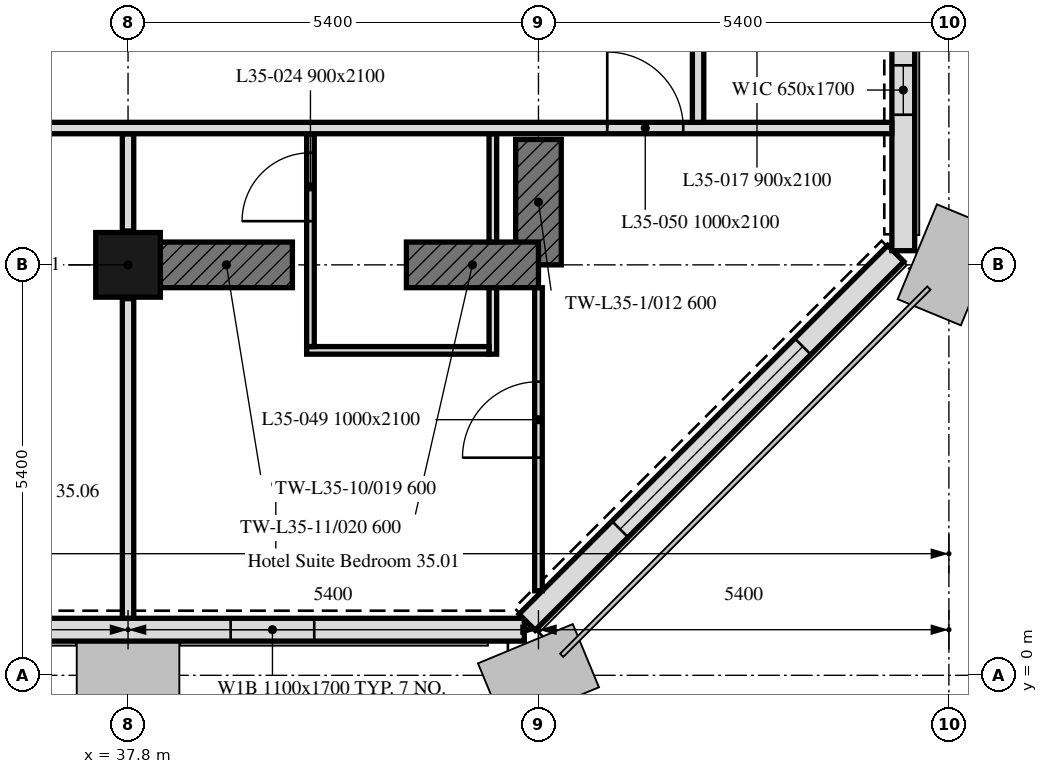
"""IFC4 building model, lengths in metres.
Left out: names, types, materials, properties, quantities, classifications, styles, units other than length and angle.
Written with IfcOpenShell. Run it as: python <this file> out.ifc"""

import sys

from ifc_helpers import new_model, si_unit, direction, frame, frame_2d, origin, origin_2d, place, context, subcontext, project, spatial, rectangle, extrude, element, fill, save


model = new_model("IFC4")
c1 = context("Model", 3, precision=1e-05, world=origin(), true_north=direction((0.0, 1.0)))
c2 = subcontext(c1, "Body", "Model", "MODEL_VIEW")
j1 = project(units=[si_unit("LENGTHUNIT", "METRE"), si_unit("PLANEANGLEUNIT", "RADIAN")], contexts=[c1])
p1 = place(None, origin())
s1 = spatial("IfcSite", under=j1, at=p1, CompositionType="ELEMENT")
p2 = place(p1, origin())
s2 = spatial("IfcBuilding", under=s1, at=p2, CompositionType="ELEMENT")
p3 = place(p2, frame((0.0, 0.0, 152.8)))
s3 = spatial("IfcBuildingStorey", under=s2, at=p3, CompositionType="ELEMENT", Elevation=152.8)
p4 = place(p3, frame((37.8, 5.4, 0.0), z_axis=(0.0, 0.0, 1.0), x_axis=(1.0, 0.0, 0.0)))
e1 = element("IfcColumn", 1, at=p4, inside=s3, PredefinedType="COLUMN", context=c2, shape_type="SweptSolid", body=[
    extrude(rectangle(XDim=0.85, YDim=0.85, at=origin_2d()), origin(), (0.0, 0.0, 1.0), 3.0),
])
p5 = place(p3, frame((43.2, 5.4, 0.0), z_axis=(0.0, 0.0, 1.0), x_axis=(0.0, 1.0, 0.0)))
e2 = element("IfcWall", 2, at=p5, inside=s3, PredefinedType="SHEAR", context=c2, shape_type="SweptSolid", body=[
    extrude(rectangle(XDim=1.65, YDim=0.6, at=frame_2d((0.825, 0.0))), origin(), (0.0, 0.0, 1.0), 3.0),
])
p6 = place(p3, frame((38.225, 5.4, 0.0), z_axis=(0.0, 0.0, 1.0), x_axis=(1.0, 0.0, 0.0)))
e3 = element("IfcWall", 3, at=p6, inside=s3, PredefinedType="SHEAR", context=c2, shape_type="SweptSolid", body=[
    extrude(rectangle(XDim=1.737, YDim=0.6, at=frame_2d((0.869, 0.0))), origin(), (0.0, 0.0, 1.0), 3.0),
])
p7 = place(p3, frame((41.462, 5.4, 0.0), z_axis=(0.0, 0.0, 1.0), x_axis=(1.0, 0.0, 0.0)))
e4 = element("IfcWall", 4, at=p7, inside=s3, PredefinedType="SHEAR", context=c2, shape_type="SweptSolid", body=[
    extrude(rectangle(XDim=1.738, YDim=0.6, at=frame_2d((0.869, 0.0))), origin(), (0.0, 0.0, 1.0), 3.0),
])
p8 = place(p3, frame((10.986, 0.6, 0.0), z_axis=(0.0, 0.0, 1.0), x_axis=(1.0, 0.0, 0.0)))
e5 = element("IfcWall", 5, at=p8, inside=s3, PredefinedType="SOLIDWALL", context=c2, shape_type="SweptSolid", body=[
    extrude(rectangle(XDim=32.027, YDim=0.3, at=frame_2d((16.014, 0.0))), origin(), (0.0, 0.0, 1.0), 3.0),
])
p9 = place(p8, frame((0.814, 0.0, 0.9)))
e6 = element("IfcOpeningElement", 6, at=p9, cuts=e5, PredefinedType="OPENING", context=c2, shape_type="SweptSolid", body=[
    extrude(rectangle(XDim=3.4, YDim=1.7, at=frame_2d((1.7, 0.85))), frame((0.0, 0.16, 0.0), z_axis=(0.0, -1.0, 0.0), x_axis=(1.0, 0.0, 0.0)), (0.0, 0.0, 1.0), 0.32),
])
p10 = place(p8, frame((7.664, 0.0, 0.9)))
e7 = element("IfcOpeningElement", 7, at=p10, cuts=e5, PredefinedType="OPENING", context=c2, shape_type="SweptSolid", body=[
    extrude(rectangle(XDim=0.5, YDim=1.7, at=frame_2d((0.25, 0.85))), frame((0.0, 0.16, 0.0), z_axis=(0.0, -1.0, 0.0), x_axis=(1.0, 0.0, 0.0)), (0.0, 0.0, 1.0), 0.32),
])
p11 = place(p8, frame((13.064, 0.0, 0.9)))
e8 = element("IfcOpeningElement", 8, at=p11, cuts=e5, PredefinedType="OPENING", context=c2, shape_type="SweptSolid", body=[
    extrude(rectangle(XDim=0.5, YDim=1.7, at=frame_2d((0.25, 0.85))), frame((0.0, 0.16, 0.0), z_axis=(0.0, -1.0, 0.0), x_axis=(1.0, 0.0, 0.0)), (0.0, 0.0, 1.0), 0.32),
])
p12 = place(p8, frame((18.464, 0.0, 0.9)))
e9 = element("IfcOpeningElement", 9, at=p12, cuts=e5, PredefinedType="OPENING", context=c2, shape_type="SweptSolid", body=[
    extrude(rectangle(XDim=0.5, YDim=1.7, at=frame_2d((0.25, 0.85))), frame((0.0, 0.16, 0.0), z_axis=(0.0, -1.0, 0.0), x_axis=(1.0, 0.0, 0.0)), (0.0, 0.0, 1.0), 0.32),
])
p13 = place(p8, frame((23.864, 0.0, 0.9)))
e10 = element("IfcOpeningElement", 10, at=p13, cuts=e5, PredefinedType="OPENING", context=c2, shape_type="SweptSolid", body=[
    extrude(rectangle(XDim=0.5, YDim=1.7, at=frame_2d((0.25, 0.85))), frame((0.0, 0.16, 0.0), z_axis=(0.0, -1.0, 0.0), x_axis=(1.0, 0.0, 0.0)), (0.0, 0.0, 1.0), 0.32),
])
p14 = place(p8, frame((28.164, 0.0, 0.9)))
e11 = element("IfcOpeningElement", 11, at=p14, cuts=e5, PredefinedType="OPENING", context=c2, shape_type="SweptSolid", body=[
    extrude(rectangle(XDim=1.1, YDim=1.7, at=frame_2d((0.55, 0.85))), frame((0.0, 0.16, 0.0), z_axis=(0.0, -1.0, 0.0), x_axis=(1.0, 0.0, 0.0)), (0.0, 0.0, 1.0), 0.32),
])
p15 = place(p3, frame((43.051, 0.699, 0.0), z_axis=(0.0, 0.0, 1.0), x_axis=(0.707106781187, 0.707106781187, 0.0)))
e12 = element("IfcWall", 12, at=p15, inside=s3, PredefinedType="SOLIDWALL", context=c2, shape_type="SweptSolid", body=[
    extrude(rectangle(XDim=6.86, YDim=0.3, at=frame_2d((3.43, 0.0))), origin(), (0.0, 0.0, 1.0), 3.0),
])
p16 = place(p15, frame((1.73, 0.0, 0.9)))
e13 = element("IfcOpeningElement", 13, at=p16, cuts=e12, PredefinedType="OPENING", context=c2, shape_type="SweptSolid", body=[
    extrude(rectangle(XDim=3.4, YDim=1.7, at=frame_2d((1.7, 0.85))), frame((0.0, 0.16, 0.0), z_axis=(0.0, -1.0, 0.0), x_axis=(1.0, 0.0, 0.0)), (0.0, 0.0, 1.0), 0.32),
])
p17 = place(p3, frame((48.0, 5.586, 0.0), z_axis=(0.0, 0.0, 1.0), x_axis=(0.0, 1.0, 0.0)))
e14 = element("IfcWall", 14, at=p17, inside=s3, PredefinedType="SOLIDWALL", context=c2, shape_type="SweptSolid", body=[
    extrude(rectangle(XDim=32.027, YDim=0.3, at=frame_2d((16.014, 0.0))), origin(), (0.0, 0.0, 1.0), 3.0),
])
p18 = place(p17, frame((1.789, 0.0, 0.9)))
e15 = element("IfcOpeningElement", 15, at=p18, cuts=e14, PredefinedType="OPENING", context=c2, shape_type="SweptSolid", body=[
    extrude(rectangle(XDim=0.65, YDim=1.7, at=frame_2d((0.325, 0.85))), frame((0.0, 0.16, 0.0), z_axis=(0.0, -1.0, 0.0), x_axis=(1.0, 0.0, 0.0)), (0.0, 0.0, 1.0), 0.32),
])
p19 = place(p17, frame((2.764, 0.0, 0.9)))
e16 = element("IfcOpeningElement", 16, at=p19, cuts=e14, PredefinedType="OPENING", context=c2, shape_type="SweptSolid", body=[
    extrude(rectangle(XDim=1.1, YDim=1.7, at=frame_2d((0.55, 0.85))), frame((0.0, 0.16, 0.0), z_axis=(0.0, -1.0, 0.0), x_axis=(1.0, 0.0, 0.0)), (0.0, 0.0, 1.0), 0.32),
])
p20 = place(p17, frame((7.664, 0.0, 0.9)))
e17 = element("IfcOpeningElement", 17, at=p20, cuts=e14, PredefinedType="OPENING", context=c2, shape_type="SweptSolid", body=[
    extrude(rectangle(XDim=0.5, YDim=1.7, at=frame_2d((0.25, 0.85))), frame((0.0, 0.16, 0.0), z_axis=(0.0, -1.0, 0.0), x_axis=(1.0, 0.0, 0.0)), (0.0, 0.0, 1.0), 0.32),
])
p21 = place(p17, frame((13.064, 0.0, 0.9)))
e18 = element("IfcOpeningElement", 18, at=p21, cuts=e14, PredefinedType="OPENING", context=c2, shape_type="SweptSolid", body=[
    extrude(rectangle(XDim=0.5, YDim=1.7, at=frame_2d((0.25, 0.85))), frame((0.0, 0.16, 0.0), z_axis=(0.0, -1.0, 0.0), x_axis=(1.0, 0.0, 0.0)), (0.0, 0.0, 1.0), 0.32),
])
p22 = place(p17, frame((18.464, 0.0, 0.9)))
e19 = element("IfcOpeningElement", 19, at=p22, cuts=e14, PredefinedType="OPENING", context=c2, shape_type="SweptSolid", body=[
    extrude(rectangle(XDim=0.5, YDim=1.7, at=frame_2d((0.25, 0.85))), frame((0.0, 0.16, 0.0), z_axis=(0.0, -1.0, 0.0), x_axis=(1.0, 0.0, 0.0)), (0.0, 0.0, 1.0), 0.32),
])
p23 = place(p17, frame((23.864, 0.0, 0.9)))
e20 = element("IfcOpeningElement", 20, at=p23, cuts=e14, PredefinedType="OPENING", context=c2, shape_type="SweptSolid", body=[
    extrude(rectangle(XDim=0.5, YDim=1.7, at=frame_2d((0.25, 0.85))), frame((0.0, 0.16, 0.0), z_axis=(0.0, -1.0, 0.0), x_axis=(1.0, 0.0, 0.0)), (0.0, 0.0, 1.0), 0.32),
])
p24 = place(p17, frame((28.164, 0.0, 0.9)))
e21 = element("IfcOpeningElement", 21, at=p24, cuts=e14, PredefinedType="OPENING", context=c2, shape_type="SweptSolid", body=[
    extrude(rectangle(XDim=1.1, YDim=1.7, at=frame_2d((0.55, 0.85))), frame((0.0, 0.16, 0.0), z_axis=(0.0, -1.0, 0.0), x_axis=(1.0, 0.0, 0.0)), (0.0, 0.0, 1.0), 0.32),
])
p25 = place(p17, frame((29.764, 0.0, 0.9)))
e22 = element("IfcOpeningElement", 22, at=p25, cuts=e14, PredefinedType="OPENING", context=c2, shape_type="SweptSolid", body=[
    extrude(rectangle(XDim=1.1, YDim=1.7, at=frame_2d((0.55, 0.85))), frame((0.0, 0.16, 0.0), z_axis=(0.0, -1.0, 0.0), x_axis=(1.0, 0.0, 0.0)), (0.0, 0.0, 1.0), 0.32),
])
p26 = place(p3, frame((37.8, 0.751, 0.0), z_axis=(0.0, 0.0, 1.0), x_axis=(0.0, 1.0, 0.0)))
e23 = element("IfcWall", 23, at=p26, inside=s3, PredefinedType="PARTITIONING", context=c2, shape_type="SweptSolid", body=[
    extrude(rectangle(XDim=4.204, YDim=0.15, at=frame_2d((2.102, 0.0))), origin(), (0.0, 0.0, 1.0), 2.4),
])
p27 = place(p3, frame((37.8, 5.845, 0.0), z_axis=(0.0, 0.0, 1.0), x_axis=(0.0, 1.0, 0.0)))
e24 = element("IfcWall", 24, at=p27, inside=s3, PredefinedType="PARTITIONING", context=c2, shape_type="SweptSolid", body=[
    extrude(rectangle(XDim=1.28, YDim=0.15, at=frame_2d((0.64, 0.0))), origin(), (0.0, 0.0, 1.0), 2.4),
])
p28 = place(p3, frame((43.2, 1.112, 0.0), z_axis=(0.0, 0.0, 1.0), x_axis=(0.0, 1.0, 0.0)))
e25 = element("IfcWall", 25, at=p28, inside=s3, PredefinedType="PARTITIONING", context=c2, shape_type="SweptSolid", body=[
    extrude(rectangle(XDim=3.987, YDim=0.1, at=frame_2d((1.994, 0.0))), origin(), (0.0, 0.0, 1.0), 3.0),
])
p29 = place(p28, frame((1.751, 0.0, 0.0)))
e26 = element("IfcOpeningElement", 26, at=p29, cuts=e25, PredefinedType="OPENING", context=c2, shape_type="SweptSolid", body=[
    extrude(rectangle(XDim=1.0, YDim=2.1, at=frame_2d((0.5, 1.05))), frame((0.0, 0.05, 0.0), z_axis=(0.0, -1.0, 0.0), x_axis=(1.0, 0.0, 0.0)), (0.0, 0.0, 1.0), 0.1),
])
p30 = place(p3, frame((42.6, 7.125, 0.0), z_axis=(0.0, 0.0, 1.0), x_axis=(0.0, -1.0, 0.0)))
e27 = element("IfcWall", 27, at=p30, inside=s3, PredefinedType="PARTITIONING", context=c2, shape_type="SweptSolid", body=[
    extrude(rectangle(XDim=1.424, YDim=0.1, at=frame_2d((0.712, 0.0))), origin(), (0.0, 0.0, 1.0), 3.0),
])
p31 = place(p3, frame((42.6, 5.099, 0.0), z_axis=(0.0, 0.0, 1.0), x_axis=(0.0, -1.0, 0.0)))
e28 = element("IfcWall", 28, at=p31, inside=s3, PredefinedType="PARTITIONING", context=c2, shape_type="SweptSolid", body=[
    extrude(rectangle(XDim=0.874, YDim=0.1, at=frame_2d((0.437, 0.0))), origin(), (0.0, 0.0, 1.0), 3.0),
])
p32 = place(p3, frame((42.55, 4.275, 0.0), z_axis=(0.0, 0.0, 1.0), x_axis=(-1.0, 0.0, 0.0)))
e29 = element("IfcWall", 29, at=p32, inside=s3, PredefinedType="PARTITIONING", context=c2, shape_type="SweptSolid", body=[
    extrude(rectangle(XDim=2.4, YDim=0.1, at=frame_2d((1.2, 0.0))), origin(), (0.0, 0.0, 1.0), 3.0),
])
p33 = place(p3, frame((40.2, 4.325, 0.0), z_axis=(0.0, 0.0, 1.0), x_axis=(0.0, 1.0, 0.0)))
e30 = element("IfcWall", 30, at=p33, inside=s3, PredefinedType="PARTITIONING", context=c2, shape_type="SweptSolid", body=[
    extrude(rectangle(XDim=2.8, YDim=0.1, at=frame_2d((1.4, 0.0))), origin(), (0.0, 0.0, 1.0), 3.0),
])
p34 = place(p33, frame((1.65, 0.0, 0.0)))
e31 = element("IfcOpeningElement", 31, at=p34, cuts=e30, PredefinedType="OPENING", context=c2, shape_type="SweptSolid", body=[
    extrude(rectangle(XDim=0.9, YDim=2.1, at=frame_2d((0.45, 1.05))), frame((0.0, 0.05, 0.0), z_axis=(0.0, -1.0, 0.0), x_axis=(1.0, 0.0, 0.0)), (0.0, 0.0, 1.0), 0.1),
])
p35 = place(p3, frame((6.151, 7.2, 0.0), z_axis=(0.0, 0.0, 1.0), x_axis=(1.0, 0.0, 0.0)))
e32 = element("IfcWall", 32, at=p35, inside=s3, PredefinedType="PARTITIONING", context=c2, shape_type="SweptSolid", body=[
    extrude(rectangle(XDim=41.698, YDim=0.15, at=frame_2d((20.849, 0.0))), origin(), (0.0, 0.0, 1.0), 2.4),
])
p36 = place(p35, frame((2.249, 0.0, 0.0)))
e33 = element("IfcOpeningElement", 33, at=p36, cuts=e32, PredefinedType="OPENING", context=c2, shape_type="SweptSolid", body=[
    extrude(rectangle(XDim=1.0, YDim=2.1, at=frame_2d((0.5, 1.05))), frame((0.0, 0.075, 0.0), z_axis=(0.0, -1.0, 0.0), x_axis=(1.0, 0.0, 0.0)), (0.0, 0.0, 1.0), 0.15),
])
p37 = place(p35, frame((7.649, 0.0, 0.0)))
e34 = element("IfcOpeningElement", 34, at=p37, cuts=e32, PredefinedType="OPENING", context=c2, shape_type="SweptSolid", body=[
    extrude(rectangle(XDim=1.0, YDim=2.1, at=frame_2d((0.5, 1.05))), frame((0.0, 0.075, 0.0), z_axis=(0.0, -1.0, 0.0), x_axis=(1.0, 0.0, 0.0)), (0.0, 0.0, 1.0), 0.15),
])
p38 = place(p35, frame((13.049, 0.0, 0.0)))
e35 = element("IfcOpeningElement", 35, at=p38, cuts=e32, PredefinedType="OPENING", context=c2, shape_type="SweptSolid", body=[
    extrude(rectangle(XDim=1.0, YDim=2.1, at=frame_2d((0.5, 1.05))), frame((0.0, 0.075, 0.0), z_axis=(0.0, -1.0, 0.0), x_axis=(1.0, 0.0, 0.0)), (0.0, 0.0, 1.0), 0.15),
])
p39 = place(p35, frame((18.449, 0.0, 0.0)))
e36 = element("IfcOpeningElement", 36, at=p39, cuts=e32, PredefinedType="OPENING", context=c2, shape_type="SweptSolid", body=[
    extrude(rectangle(XDim=1.0, YDim=2.1, at=frame_2d((0.5, 1.05))), frame((0.0, 0.075, 0.0), z_axis=(0.0, -1.0, 0.0), x_axis=(1.0, 0.0, 0.0)), (0.0, 0.0, 1.0), 0.15),
])
p40 = place(p35, frame((23.849, 0.0, 0.0)))
e37 = element("IfcOpeningElement", 37, at=p40, cuts=e32, PredefinedType="OPENING", context=c2, shape_type="SweptSolid", body=[
    extrude(rectangle(XDim=1.0, YDim=2.1, at=frame_2d((0.5, 1.05))), frame((0.0, 0.075, 0.0), z_axis=(0.0, -1.0, 0.0), x_axis=(1.0, 0.0, 0.0)), (0.0, 0.0, 1.0), 0.15),
])
p41 = place(p35, frame((29.249, 0.0, 0.0)))
e38 = element("IfcOpeningElement", 38, at=p41, cuts=e32, PredefinedType="OPENING", context=c2, shape_type="SweptSolid", body=[
    extrude(rectangle(XDim=1.0, YDim=2.1, at=frame_2d((0.5, 1.05))), frame((0.0, 0.075, 0.0), z_axis=(0.0, -1.0, 0.0), x_axis=(1.0, 0.0, 0.0)), (0.0, 0.0, 1.0), 0.15),
])
p42 = place(p35, frame((37.954, 0.0, 0.0)))
e39 = element("IfcOpeningElement", 39, at=p42, cuts=e32, PredefinedType="OPENING", context=c2, shape_type="SweptSolid", body=[
    extrude(rectangle(XDim=1.0, YDim=2.1, at=frame_2d((0.5, 1.05))), frame((0.0, 0.075, 0.0), z_axis=(0.0, -1.0, 0.0), x_axis=(1.0, 0.0, 0.0)), (0.0, 0.0, 1.0), 0.15),
])
p43 = place(p3, frame((45.3, 36.825, 0.0), z_axis=(0.0, 0.0, 1.0), x_axis=(0.0, -1.0, 0.0)))
e40 = element("IfcWall", 40, at=p43, inside=s3, PredefinedType="PARTITIONING", context=c2, shape_type="SweptSolid", body=[
    extrude(rectangle(XDim=29.55, YDim=0.15, at=frame_2d((14.775, 0.0))), origin(), (0.0, 0.0, 1.0), 2.4),
])
p44 = place(p43, frame((1.675, 0.0, 0.0)))
e41 = element("IfcOpeningElement", 41, at=p44, cuts=e40, PredefinedType="OPENING", context=c2, shape_type="SweptSolid", body=[
    extrude(rectangle(XDim=1.0, YDim=2.1, at=frame_2d((0.5, 1.05))), frame((0.0, 0.075, 0.0), z_axis=(0.0, -1.0, 0.0), x_axis=(1.0, 0.0, 0.0)), (0.0, 0.0, 1.0), 0.15),
])
p45 = place(p43, frame((17.425, 0.0, 0.0)))
e42 = element("IfcOpeningElement", 42, at=p45, cuts=e40, PredefinedType="OPENING", context=c2, shape_type="SweptSolid", body=[
    extrude(rectangle(XDim=1.0, YDim=2.1, at=frame_2d((0.5, 1.05))), frame((0.0, 0.075, 0.0), z_axis=(0.0, -1.0, 0.0), x_axis=(1.0, 0.0, 0.0)), (0.0, 0.0, 1.0), 0.15),
])
p46 = place(p43, frame((7.975, 0.0, 0.0)))
e43 = element("IfcOpeningElement", 43, at=p46, cuts=e40, PredefinedType="OPENING", context=c2, shape_type="SweptSolid", body=[
    extrude(rectangle(XDim=1.0, YDim=2.1, at=frame_2d((0.5, 1.05))), frame((0.0, 0.075, 0.0), z_axis=(0.0, -1.0, 0.0), x_axis=(1.0, 0.0, 0.0)), (0.0, 0.0, 1.0), 0.15),
])
p47 = place(p43, frame((23.275, 0.0, 0.0)))
e44 = element("IfcOpeningElement", 44, at=p47, cuts=e40, PredefinedType="OPENING", context=c2, shape_type="SweptSolid", body=[
    extrude(rectangle(XDim=1.0, YDim=2.1, at=frame_2d((0.5, 1.05))), frame((0.0, 0.075, 0.0), z_axis=(0.0, -1.0, 0.0), x_axis=(1.0, 0.0, 0.0)), (0.0, 0.0, 1.0), 0.15),
])
p48 = place(p14, origin())
e45 = element("IfcWindow", 45, at=p48, inside=s3, PartitioningType="SINGLE_PANEL", PredefinedType="WINDOW", context=c2, shape_type="SweptSolid", body=[
    extrude(rectangle(XDim=1.1, YDim=1.7, at=frame_2d((0.55, 0.85))), frame((0.0, 0.03, 0.0), z_axis=(0.0, -1.0, 0.0), x_axis=(1.0, 0.0, 0.0)), (0.0, 0.0, 1.0), 0.06),
])
fill(e11, e45)
p49 = place(p16, origin())
e46 = element("IfcWindow", 46, at=p49, inside=s3, PartitioningType="SINGLE_PANEL", PredefinedType="WINDOW", context=c2, shape_type="SweptSolid", body=[
    extrude(rectangle(XDim=3.4, YDim=1.7, at=frame_2d((1.7, 0.85))), frame((0.0, 0.03, 0.0), z_axis=(0.0, -1.0, 0.0), x_axis=(1.0, 0.0, 0.0)), (0.0, 0.0, 1.0), 0.06),
])
fill(e13, e46)
p50 = place(p18, origin())
e47 = element("IfcWindow", 47, at=p50, inside=s3, PartitioningType="SINGLE_PANEL", PredefinedType="WINDOW", context=c2, shape_type="SweptSolid", body=[
    extrude(rectangle(XDim=0.65, YDim=1.7, at=frame_2d((0.325, 0.85))), frame((0.0, 0.03, 0.0), z_axis=(0.0, -1.0, 0.0), x_axis=(1.0, 0.0, 0.0)), (0.0, 0.0, 1.0), 0.06),
])
fill(e15, e47)
p51 = place(p34, origin())
e48 = element("IfcDoor", 48, at=p51, inside=s3, OperationType="SINGLE_SWING_RIGHT", PredefinedType="DOOR", context=c2, shape_type="SweptSolid", body=[
    extrude(rectangle(XDim=0.9, YDim=2.1, at=frame_2d((0.45, 1.05))), frame((0.0, 0.025, 0.0), z_axis=(0.0, -1.0, 0.0), x_axis=(1.0, 0.0, 0.0)), (0.0, 0.0, 1.0), 0.05),
])
fill(e31, e48)
p52 = place(p29, origin())
e49 = element("IfcDoor", 49, at=p52, inside=s3, OperationType="SINGLE_SWING_RIGHT", PredefinedType="DOOR", context=c2, shape_type="SweptSolid", body=[
    extrude(rectangle(XDim=1.0, YDim=2.1, at=frame_2d((0.5, 1.05))), frame((0.0, 0.025, 0.0), z_axis=(0.0, -1.0, 0.0), x_axis=(1.0, 0.0, 0.0)), (0.0, 0.0, 1.0), 0.05),
])
fill(e26, e49)
p53 = place(p42, origin())
e50 = element("IfcDoor", 50, at=p53, inside=s3, OperationType="SINGLE_SWING_LEFT", PredefinedType="DOOR", context=c2, shape_type="SweptSolid", body=[
    extrude(rectangle(XDim=1.0, YDim=2.1, at=frame_2d((0.5, 1.05))), frame((0.0, 0.025, 0.0), z_axis=(0.0, -1.0, 0.0), x_axis=(1.0, 0.0, 0.0)), (0.0, 0.0, 1.0), 0.05),
])
fill(e39, e50)
save(model, sys.argv[1])
